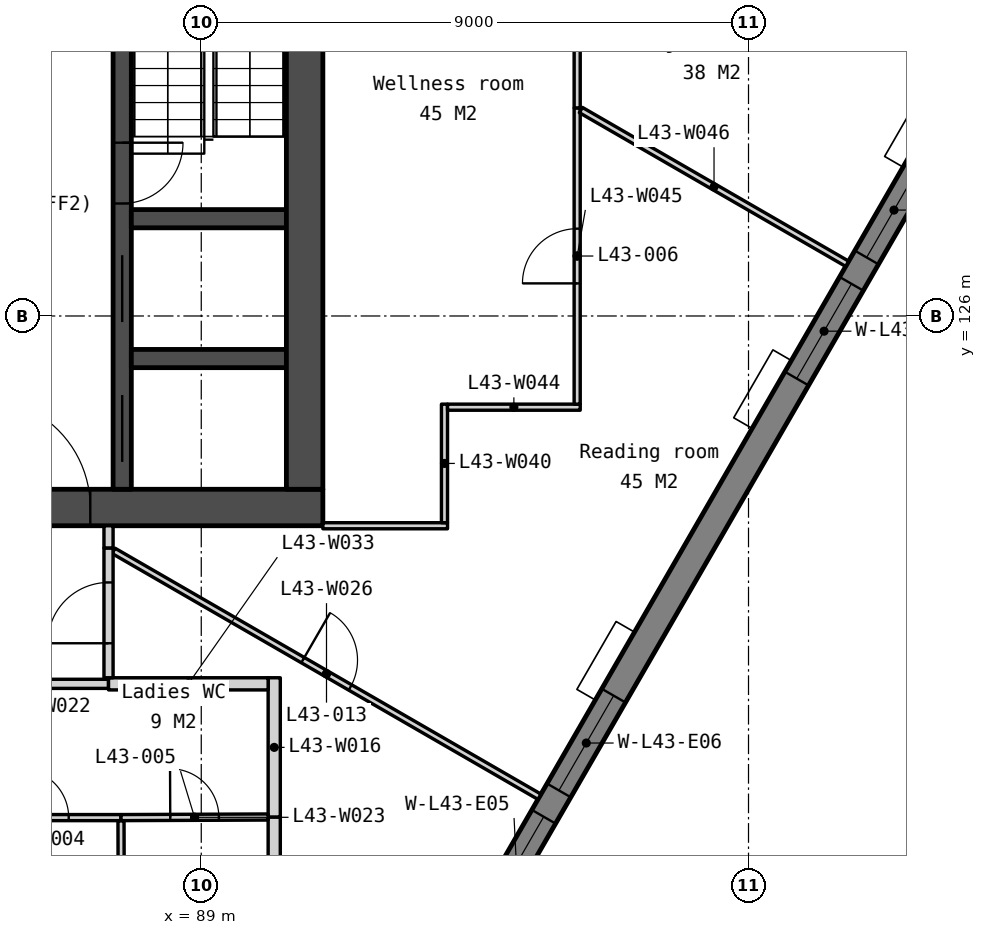
"""IFC4 building model, lengths in metres.
Left out: names, types, materials, properties, quantities, classifications, styles, units other than length and angle.
Written with IfcOpenShell. Run it as: python <this file> out.ifc"""

import sys

from ifc_helpers import new_model, si_unit, direction, frame, frame_2d, origin, place, context, subcontext, project, spatial, polyline, rectangle, outline, extrude, element, fill, save


model = new_model("IFC4")
c1 = context("Model", 3, precision=1e-05, world=origin(), true_north=direction((0.0, 1.0)))
c2 = subcontext(c1, "Body", "Model", "MODEL_VIEW")
j1 = project(units=[si_unit("LENGTHUNIT", "METRE"), si_unit("PLANEANGLEUNIT", "RADIAN")], contexts=[c1])
p1 = place(None, origin())
s1 = spatial("IfcSite", under=j1, at=p1, CompositionType="ELEMENT")
p2 = place(p1, origin())
s2 = spatial("IfcBuilding", under=s1, at=p2, CompositionType="ELEMENT")
p3 = place(p2, frame((0.0, 0.0, 171.5)))
s3 = spatial("IfcBuildingStorey", under=s2, at=p3, CompositionType="ELEMENT", Elevation=171.5)
p4 = place(p3, frame((69.0, 122.85, 0.0), z_axis=(0.0, 0.0, 1.0), x_axis=(1.0, 0.0, 0.0)))
e1 = element("IfcWall", 1, at=p4, inside=s3, PredefinedType="SOLIDWALL", context=c2, shape_type="SweptSolid", body=[
    extrude(rectangle(XDim=22.0, YDim=0.6, at=frame_2d((11.0, 0.0))), origin(), (0.0, 0.0, 1.0), 3.65),
])
p5 = place(p4, frame((16.375, 0.0, 0.0)))
e2 = element("IfcOpeningElement", 2, at=p5, cuts=e1, PredefinedType="OPENING", context=c2, shape_type="SweptSolid", body=[
    extrude(rectangle(XDim=1.8, YDim=2.1, at=frame_2d((0.9, 1.05))), frame((0.0, 0.31, 0.0), z_axis=(0.0, -1.0, 0.0), x_axis=(1.0, 0.0, 0.0)), (0.0, 0.0, 1.0), 0.62),
])
p6 = place(p4, frame((3.825, 0.0, 0.0)))
e3 = element("IfcOpeningElement", 3, at=p6, cuts=e1, PredefinedType="OPENING", context=c2, shape_type="SweptSolid", body=[
    extrude(rectangle(XDim=1.8, YDim=2.1, at=frame_2d((0.9, 1.05))), frame((0.0, 0.31, 0.0), z_axis=(0.0, -1.0, 0.0), x_axis=(1.0, 0.0, 0.0)), (0.0, 0.0, 1.0), 0.62),
])
p7 = place(p4, frame((12.85, 0.0, 0.0)))
e4 = element("IfcOpeningElement", 4, at=p7, cuts=e1, PredefinedType="OPENING", context=c2, shape_type="SweptSolid", body=[
    extrude(rectangle(XDim=1.5, YDim=2.1, at=frame_2d((0.75, 1.05))), frame((0.0, 0.31, 0.0), z_axis=(0.0, -1.0, 0.0), x_axis=(1.0, 0.0, 0.0)), (0.0, 0.0, 1.0), 0.62),
])
p8 = place(p3, frame((87.7, 133.95, 0.0), z_axis=(0.0, 0.0, 1.0), x_axis=(0.0, -1.0, 0.0)))
e5 = element("IfcWall", 5, at=p8, inside=s3, PredefinedType="SOLIDWALL", context=c2, shape_type="SweptSolid", body=[
    extrude(rectangle(XDim=10.8, YDim=0.3, at=frame_2d((5.4, 0.0))), origin(), (0.0, 0.0, 1.0), 3.65),
])
p9 = place(p8, frame((6.95, 0.0, 0.0)))
e6 = element("IfcOpeningElement", 6, at=p9, cuts=e5, PredefinedType="OPENING", context=c2, shape_type="SweptSolid", body=[
    extrude(rectangle(XDim=1.1, YDim=2.1, at=frame_2d((0.55, 1.05))), frame((0.0, 0.16, 0.0), z_axis=(0.0, -1.0, 0.0), x_axis=(1.0, 0.0, 0.0)), (0.0, 0.0, 1.0), 0.32),
])
p10 = place(p8, frame((5.1, 0.0, 0.0)))
e7 = element("IfcOpeningElement", 7, at=p10, cuts=e5, PredefinedType="OPENING", context=c2, shape_type="SweptSolid", body=[
    extrude(rectangle(XDim=1.0, YDim=2.1, at=frame_2d((0.5, 1.05))), frame((0.0, 0.16, 0.0), z_axis=(0.0, -1.0, 0.0), x_axis=(1.0, 0.0, 0.0)), (0.0, 0.0, 1.0), 0.32),
])
p11 = place(p8, frame((9.25, 0.0, 0.0)))
e8 = element("IfcOpeningElement", 8, at=p11, cuts=e5, PredefinedType="OPENING", context=c2, shape_type="SweptSolid", body=[
    extrude(rectangle(XDim=1.1, YDim=2.1, at=frame_2d((0.55, 1.05))), frame((0.0, 0.16, 0.0), z_axis=(0.0, -1.0, 0.0), x_axis=(1.0, 0.0, 0.0)), (0.0, 0.0, 1.0), 0.32),
])
for number, where, z_axis, x_axis in (
    (9, (87.85, 127.6, 0.0), (0.0, 0.0, 1.0), (1.0, 0.0, 0.0)),
    (10, (87.85, 125.3, 0.0), (0.0, 0.0, 1.0), (1.0, 0.0, 0.0)),
):
    element("IfcWall", number, at=place(p3, frame(where, z_axis=z_axis, x_axis=x_axis)), inside=s3, PredefinedType="SOLIDWALL", context=c2, shape_type="SweptSolid", body=[
        extrude(rectangle(XDim=2.55, YDim=0.3, at=frame_2d((1.275, 0.0))), origin(), (0.0, 0.0, 1.0), 3.65),
    ])
p12 = place(p3, frame((90.7, 133.95, 0.0), z_axis=(0.0, 0.0, 1.0), x_axis=(0.0, -1.0, 0.0)))
e11 = element("IfcWall", 11, at=p12, inside=s3, PredefinedType="SOLIDWALL", context=c2, shape_type="SweptSolid", body=[
    extrude(rectangle(XDim=10.8, YDim=0.6, at=frame_2d((5.4, 0.0))), origin(), (0.0, 0.0, 1.0), 3.65),
])
p13 = place(p3, frame((82.105, 96.067, -0.15), z_axis=(0.0, 0.0, 1.0), x_axis=(0.499997369791, 0.866026922331, 0.0)))
e12 = element("IfcWall", 12, at=p13, inside=s3, PredefinedType="SOLIDWALL", context=c2, shape_type="SweptSolid", body=[
    extrude(outline(polyline([(40.486, 0.0), (40.486, 3.8), (0.0, 3.8), (0.0, 0.0), (40.486, 0.0)])), frame((0.0, 0.225, 0.0), z_axis=(0.0, -1.0, 0.0), x_axis=(1.0, 0.0, 0.0)), (0.0, 0.0, 1.0), 0.45),
])
p14 = place(p13, frame((3.011, 0.0, 0.95)))
e13 = element("IfcOpeningElement", 13, at=p14, cuts=e12, PredefinedType="OPENING", context=c2, shape_type="SweptSolid", body=[
    extrude(rectangle(XDim=1.8, YDim=2.2, at=frame_2d((0.9, 1.1))), frame((0.0, 0.235, 0.0), z_axis=(0.0, -1.0, 0.0), x_axis=(1.0, 0.0, 0.0)), (0.0, 0.0, 1.0), 0.47),
])
p15 = place(p13, frame((5.311, 0.0, 0.95)))
e14 = element("IfcOpeningElement", 14, at=p15, cuts=e12, PredefinedType="OPENING", context=c2, shape_type="SweptSolid", body=[
    extrude(rectangle(XDim=1.8, YDim=2.2, at=frame_2d((0.9, 1.1))), frame((0.0, 0.235, 0.0), z_axis=(0.0, -1.0, 0.0), x_axis=(1.0, 0.0, 0.0)), (0.0, 0.0, 1.0), 0.47),
])
p16 = place(p13, frame((13.132, 0.0, 0.95)))
e15 = element("IfcOpeningElement", 15, at=p16, cuts=e12, PredefinedType="OPENING", context=c2, shape_type="SweptSolid", body=[
    extrude(rectangle(XDim=1.8, YDim=2.2, at=frame_2d((0.9, 1.1))), frame((0.0, 0.235, 0.0), z_axis=(0.0, -1.0, 0.0), x_axis=(1.0, 0.0, 0.0)), (0.0, 0.0, 1.0), 0.47),
])
p17 = place(p13, frame((15.432, 0.0, 0.95)))
e16 = element("IfcOpeningElement", 16, at=p17, cuts=e12, PredefinedType="OPENING", context=c2, shape_type="SweptSolid", body=[
    extrude(rectangle(XDim=1.8, YDim=2.2, at=frame_2d((0.9, 1.1))), frame((0.0, 0.235, 0.0), z_axis=(0.0, -1.0, 0.0), x_axis=(1.0, 0.0, 0.0)), (0.0, 0.0, 1.0), 0.47),
])
p18 = place(p13, frame((23.254, 0.0, 0.95)))
e17 = element("IfcOpeningElement", 17, at=p18, cuts=e12, PredefinedType="OPENING", context=c2, shape_type="SweptSolid", body=[
    extrude(rectangle(XDim=1.8, YDim=2.2, at=frame_2d((0.9, 1.1))), frame((0.0, 0.235, 0.0), z_axis=(0.0, -1.0, 0.0), x_axis=(1.0, 0.0, 0.0)), (0.0, 0.0, 1.0), 0.47),
])
p19 = place(p13, frame((25.554, 0.0, 0.95)))
e18 = element("IfcOpeningElement", 18, at=p19, cuts=e12, PredefinedType="OPENING", context=c2, shape_type="SweptSolid", body=[
    extrude(rectangle(XDim=1.8, YDim=2.2, at=frame_2d((0.9, 1.1))), frame((0.0, 0.235, 0.0), z_axis=(0.0, -1.0, 0.0), x_axis=(1.0, 0.0, 0.0)), (0.0, 0.0, 1.0), 0.47),
])
p20 = place(p13, frame((33.375, 0.0, 0.95)))
e19 = element("IfcOpeningElement", 19, at=p20, cuts=e12, PredefinedType="OPENING", context=c2, shape_type="SweptSolid", body=[
    extrude(rectangle(XDim=1.8, YDim=2.2, at=frame_2d((0.9, 1.1))), frame((0.0, 0.235, 0.0), z_axis=(0.0, -1.0, 0.0), x_axis=(1.0, 0.0, 0.0)), (0.0, 0.0, 1.0), 0.47),
])
p21 = place(p13, frame((35.675, 0.0, 0.95)))
e20 = element("IfcOpeningElement", 20, at=p21, cuts=e12, PredefinedType="OPENING", context=c2, shape_type="SweptSolid", body=[
    extrude(rectangle(XDim=1.8, YDim=2.2, at=frame_2d((0.9, 1.1))), frame((0.0, 0.235, 0.0), z_axis=(0.0, -1.0, 0.0), x_axis=(1.0, 0.0, 0.0)), (0.0, 0.0, 1.0), 0.47),
])
p22 = place(p3, frame((90.2, 114.05, 0.0), z_axis=(0.0, 0.0, 1.0), x_axis=(0.0, 1.0, 0.0)))
e21 = element("IfcWall", 21, at=p22, inside=s3, PredefinedType="PARTITIONING", context=c2, shape_type="SweptSolid", body=[
    extrude(rectangle(XDim=3.71, YDim=0.2, at=frame_2d((1.855, 0.0))), origin(), (0.0, 0.0, 1.0), 3.65),
])
p23 = place(p3, frame((90.2, 117.76, 0.0), z_axis=(0.0, 0.0, 1.0), x_axis=(0.0, 1.0, 0.0)))
e22 = element("IfcWall", 22, at=p23, inside=s3, PredefinedType="PARTITIONING", context=c2, shape_type="SweptSolid", body=[
    extrude(rectangle(XDim=2.29, YDim=0.2, at=frame_2d((1.145, 0.0))), origin(), (0.0, 0.0, 1.0), 3.65),
])
p24 = place(p3, frame((87.69, 114.05, 0.0), z_axis=(0.0, 0.0, 1.0), x_axis=(-0.002608686776, 0.999996597371, 0.0)))
e23 = element("IfcWall", 23, at=p24, inside=s3, PredefinedType="PARTITIONING", context=c2, shape_type="SweptSolid", body=[
    extrude(rectangle(XDim=3.65, YDim=0.1, at=frame_2d((1.825, 0.0))), origin(), (0.0, 0.0, 1.0), 3.65),
])
p25 = place(p3, frame((85.16, 117.75, 0.0), z_axis=(0.0, 0.0, 1.0), x_axis=(1.0, 0.0, 0.0)))
e24 = element("IfcWall", 24, at=p25, inside=s3, PredefinedType="PARTITIONING", context=c2, shape_type="SweptSolid", body=[
    extrude(rectangle(XDim=2.52, YDim=0.1, at=frame_2d((1.26, 0.0))), origin(), (0.0, 0.0, 1.0), 3.65),
])
p26 = place(p25, frame((0.86, 0.0, 0.0)))
e25 = element("IfcOpeningElement", 25, at=p26, cuts=e24, PredefinedType="OPENING", context=c2, shape_type="SweptSolid", body=[
    extrude(rectangle(XDim=0.8, YDim=2.1, at=frame_2d((0.4, 1.05))), frame((0.0, 0.06, 0.0), z_axis=(0.0, -1.0, 0.0), x_axis=(1.0, 0.0, 0.0)), (0.0, 0.0, 1.0), 0.12),
])
p27 = place(p3, frame((87.68, 117.75, 0.0), z_axis=(0.0, 0.0, 1.0), x_axis=(0.999992261016, 0.003934197335, 0.0)))
e26 = element("IfcWall", 26, at=p27, inside=s3, PredefinedType="PARTITIONING", context=c2, shape_type="SweptSolid", body=[
    extrude(rectangle(XDim=2.42, YDim=0.1, at=frame_2d((1.21, 0.0))), origin(), (0.0, 0.0, 1.0), 3.65),
])
p28 = place(p27, frame((0.81, 0.0, 0.0)))
e27 = element("IfcOpeningElement", 27, at=p28, cuts=e26, PredefinedType="OPENING", context=c2, shape_type="SweptSolid", body=[
    extrude(rectangle(XDim=0.8, YDim=2.1, at=frame_2d((0.4, 1.05))), frame((0.0, 0.06, 0.0), z_axis=(0.0, -1.0, 0.0), x_axis=(1.0, 0.0, 0.0)), (0.0, 0.0, 1.0), 0.12),
])
p29 = place(p3, frame((87.557, 122.137, 0.0), z_axis=(0.0, 0.0, 1.0), x_axis=(0.866029768103, -0.499992440702, 0.0)))
e28 = element("IfcWall", 28, at=p29, inside=s3, PredefinedType="PARTITIONING", context=c2, shape_type="SweptSolid", body=[
    extrude(rectangle(XDim=8.089, YDim=0.1, at=frame_2d((4.044, 0.0))), origin(), (0.0, 0.0, 1.0), 3.65),
])
p30 = place(p29, frame((3.594, 0.0, 0.0)))
e29 = element("IfcOpeningElement", 29, at=p30, cuts=e28, PredefinedType="OPENING", context=c2, shape_type="SweptSolid", body=[
    extrude(rectangle(XDim=0.9, YDim=2.1, at=frame_2d((0.45, 1.05))), frame((0.0, 0.06, 0.0), z_axis=(0.0, -1.0, 0.0), x_axis=(1.0, 0.0, 0.0)), (0.0, 0.0, 1.0), 0.12),
])
p31 = place(p3, frame((81.275, 119.95, 0.0), z_axis=(0.0, 0.0, 1.0), x_axis=(1.0, 0.0, 0.0)))
e30 = element("IfcWall", 30, at=p31, inside=s3, PredefinedType="PARTITIONING", context=c2, shape_type="SweptSolid", body=[
    extrude(rectangle(XDim=6.2, YDim=0.15, at=frame_2d((3.1, 0.0))), origin(), (0.0, 0.0, 1.0), 3.65),
])
p32 = place(p31, frame((2.6, 0.0, 0.0)))
e31 = element("IfcOpeningElement", 31, at=p32, cuts=e30, PredefinedType="OPENING", context=c2, shape_type="SweptSolid", body=[
    extrude(rectangle(XDim=1.0, YDim=2.1, at=frame_2d((0.5, 1.05))), frame((0.0, 0.085, 0.0), z_axis=(0.0, -1.0, 0.0), x_axis=(1.0, 0.0, 0.0)), (0.0, 0.0, 1.0), 0.17),
])
p33 = place(p3, frame((87.475, 119.95, 0.0), z_axis=(0.0, 0.0, 1.0), x_axis=(1.0, 0.0, 0.0)))
e32 = element("IfcWall", 32, at=p33, inside=s3, PredefinedType="PARTITIONING", context=c2, shape_type="SweptSolid", body=[
    extrude(rectangle(XDim=2.625, YDim=0.2, at=frame_2d((1.312, 0.0))), origin(), (0.0, 0.0, 1.0), 3.65),
])
p34 = place(p3, frame((87.475, 120.05, 0.0), z_axis=(0.0, 0.0, 1.0), x_axis=(0.0, 1.0, 0.0)))
e33 = element("IfcWall", 33, at=p34, inside=s3, PredefinedType="PARTITIONING", context=c2, shape_type="SweptSolid", body=[
    extrude(rectangle(XDim=2.135, YDim=0.15, at=frame_2d((1.067, 0.0))), origin(), (0.0, 0.0, 1.0), 3.65),
])
p35 = place(p34, frame((0.567, 0.0, 0.0)))
e34 = element("IfcOpeningElement", 34, at=p35, cuts=e33, PredefinedType="OPENING", context=c2, shape_type="SweptSolid", body=[
    extrude(rectangle(XDim=1.0, YDim=2.1, at=frame_2d((0.5, 1.05))), frame((0.0, 0.085, 0.0), z_axis=(0.0, -1.0, 0.0), x_axis=(1.0, 0.0, 0.0)), (0.0, 0.0, 1.0), 0.17),
])
p36 = place(p3, frame((87.475, 122.185, 0.0), z_axis=(0.0, 0.0, 1.0), x_axis=(0.0, 1.0, 0.0)))
e35 = element("IfcWall", 35, at=p36, inside=s3, PredefinedType="PARTITIONING", context=c2, shape_type="SweptSolid", body=[
    extrude(rectangle(XDim=0.365, YDim=0.15, at=frame_2d((0.183, 0.0))), origin(), (0.0, 0.0, 1.0), 3.65),
])
p37 = place(p3, frame((91.0, 122.55, 0.0), z_axis=(0.0, 0.0, 1.0), x_axis=(1.0, 0.0, 0.0)))
e36 = element("IfcWall", 36, at=p37, inside=s3, PredefinedType="PARTITIONING", context=c2, shape_type="SweptSolid", body=[
    extrude(rectangle(XDim=2.05, YDim=0.1, at=frame_2d((1.025, 0.0))), origin(), (0.0, 0.0, 1.0), 3.65),
])
p38 = place(p3, frame((93.0, 122.6, 0.0), z_axis=(0.0, 0.0, 1.0), x_axis=(0.0, 1.0, 0.0)))
e37 = element("IfcWall", 37, at=p38, inside=s3, PredefinedType="PARTITIONING", context=c2, shape_type="SweptSolid", body=[
    extrude(rectangle(XDim=1.95, YDim=0.1, at=frame_2d((0.975, 0.0))), origin(), (0.0, 0.0, 1.0), 3.65),
])
p39 = place(p3, frame((93.05, 124.5, 0.0), z_axis=(0.0, 0.0, 1.0), x_axis=(1.0, 0.0, 0.0)))
e38 = element("IfcWall", 38, at=p39, inside=s3, PredefinedType="PARTITIONING", context=c2, shape_type="SweptSolid", body=[
    extrude(rectangle(XDim=2.182, YDim=0.1, at=frame_2d((1.091, 0.0))), origin(), (0.0, 0.0, 1.0), 3.65),
])
p40 = place(p3, frame((95.182, 124.55, 0.0), z_axis=(0.0, 0.0, 1.0), x_axis=(0.0, 1.0, 0.0)))
e39 = element("IfcWall", 39, at=p40, inside=s3, PredefinedType="PARTITIONING", context=c2, shape_type="SweptSolid", body=[
    extrude(rectangle(XDim=4.872, YDim=0.1, at=frame_2d((2.436, 0.0))), origin(), (0.0, 0.0, 1.0), 3.65),
])
p41 = place(p40, frame((1.986, 0.0, 0.0)))
e40 = element("IfcOpeningElement", 40, at=p41, cuts=e39, PredefinedType="OPENING", context=c2, shape_type="SweptSolid", body=[
    extrude(rectangle(XDim=0.9, YDim=2.1, at=frame_2d((0.45, 1.05))), frame((0.0, 0.06, 0.0), z_axis=(0.0, -1.0, 0.0), x_axis=(1.0, 0.0, 0.0)), (0.0, 0.0, 1.0), 0.12),
])
p42 = place(p3, frame((95.243, 129.387, 0.0), z_axis=(0.0, 0.0, 1.0), x_axis=(0.866030444867, -0.499991268487, 0.0)))
e41 = element("IfcWall", 41, at=p42, inside=s3, PredefinedType="PARTITIONING", context=c2, shape_type="SweptSolid", body=[
    extrude(rectangle(XDim=5.058, YDim=0.1, at=frame_2d((2.529, 0.0))), origin(), (0.0, 0.0, 1.0), 3.65),
])
p43 = place(p3, frame((95.182, 129.422, 0.0), z_axis=(0.0, 0.0, 1.0), x_axis=(0.0, 1.0, 0.0)))
e42 = element("IfcWall", 42, at=p43, inside=s3, PredefinedType="PARTITIONING", context=c2, shape_type="SweptSolid", body=[
    extrude(rectangle(XDim=5.128, YDim=0.1, at=frame_2d((2.564, 0.0))), origin(), (0.0, 0.0, 1.0), 3.65),
])
p44 = place(p43, frame((2.114, 0.0, 0.0)))
e43 = element("IfcOpeningElement", 43, at=p44, cuts=e42, PredefinedType="OPENING", context=c2, shape_type="SweptSolid", body=[
    extrude(rectangle(XDim=0.9, YDim=2.1, at=frame_2d((0.45, 1.05))), frame((0.0, 0.06, 0.0), z_axis=(0.0, -1.0, 0.0), x_axis=(1.0, 0.0, 0.0)), (0.0, 0.0, 1.0), 0.12),
])
p45 = place(p9, origin())
e44 = element("IfcDoor", 44, at=p45, inside=s3, OperationType="SLIDING_TO_LEFT", PredefinedType="DOOR", context=c2, shape_type="SweptSolid", body=[
    extrude(rectangle(XDim=1.1, YDim=2.1, at=frame_2d((0.55, 1.05))), frame((0.0, 0.025, 0.0), z_axis=(0.0, -1.0, 0.0), x_axis=(1.0, 0.0, 0.0)), (0.0, 0.0, 1.0), 0.05),
])
fill(e6, e44)
p46 = place(p5, origin())
e45 = element("IfcDoor", 45, at=p46, inside=s3, OperationType="DOUBLE_DOOR_DOUBLE_SWING", PredefinedType="DOOR", context=c2, shape_type="SweptSolid", body=[
    extrude(rectangle(XDim=1.8, YDim=2.1, at=frame_2d((0.9, 1.05))), frame((0.0, 0.025, 0.0), z_axis=(0.0, -1.0, 0.0), x_axis=(1.0, 0.0, 0.0)), (0.0, 0.0, 1.0), 0.05),
])
fill(e2, e45)
p47 = place(p10, origin())
e46 = element("IfcDoor", 46, at=p47, inside=s3, OperationType="SINGLE_SWING_LEFT", PredefinedType="DOOR", context=c2, shape_type="SweptSolid", body=[
    extrude(rectangle(XDim=1.0, YDim=2.1, at=frame_2d((0.5, 1.05))), frame((0.0, 0.025, 0.0), z_axis=(0.0, -1.0, 0.0), x_axis=(1.0, 0.0, 0.0)), (0.0, 0.0, 1.0), 0.05),
])
fill(e7, e46)
p48 = place(p11, origin())
e47 = element("IfcDoor", 47, at=p48, inside=s3, OperationType="SLIDING_TO_LEFT", PredefinedType="DOOR", context=c2, shape_type="SweptSolid", body=[
    extrude(rectangle(XDim=1.1, YDim=2.1, at=frame_2d((0.55, 1.05))), frame((0.0, 0.025, 0.0), z_axis=(0.0, -1.0, 0.0), x_axis=(1.0, 0.0, 0.0)), (0.0, 0.0, 1.0), 0.05),
])
fill(e8, e47)
p49 = place(p18, origin())
e48 = element("IfcWindow", 48, at=p49, inside=s3, PartitioningType="SINGLE_PANEL", PredefinedType="WINDOW", context=c2, shape_type="SweptSolid", body=[
    extrude(rectangle(XDim=1.8, YDim=2.2, at=frame_2d((0.9, 1.1))), frame((0.0, 0.03, 0.0), z_axis=(0.0, -1.0, 0.0), x_axis=(1.0, 0.0, 0.0)), (0.0, 0.0, 1.0), 0.06),
])
fill(e17, e48)
p50 = place(p19, origin())
e49 = element("IfcWindow", 49, at=p50, inside=s3, PartitioningType="SINGLE_PANEL", PredefinedType="WINDOW", context=c2, shape_type="SweptSolid", body=[
    extrude(rectangle(XDim=1.8, YDim=2.2, at=frame_2d((0.9, 1.1))), frame((0.0, 0.03, 0.0), z_axis=(0.0, -1.0, 0.0), x_axis=(1.0, 0.0, 0.0)), (0.0, 0.0, 1.0), 0.06),
])
fill(e18, e49)
p51 = place(p20, origin())
e50 = element("IfcWindow", 50, at=p51, inside=s3, PartitioningType="SINGLE_PANEL", PredefinedType="WINDOW", context=c2, shape_type="SweptSolid", body=[
    extrude(rectangle(XDim=1.8, YDim=2.2, at=frame_2d((0.9, 1.1))), frame((0.0, 0.03, 0.0), z_axis=(0.0, -1.0, 0.0), x_axis=(1.0, 0.0, 0.0)), (0.0, 0.0, 1.0), 0.06),
])
fill(e19, e50)
p52 = place(p21, origin())
e51 = element("IfcWindow", 51, at=p52, inside=s3, PartitioningType="SINGLE_PANEL", PredefinedType="WINDOW", context=c2, shape_type="SweptSolid", body=[
    extrude(rectangle(XDim=1.8, YDim=2.2, at=frame_2d((0.9, 1.1))), frame((0.0, 0.03, 0.0), z_axis=(0.0, -1.0, 0.0), x_axis=(1.0, 0.0, 0.0)), (0.0, 0.0, 1.0), 0.06),
])
fill(e20, e51)
p53 = place(p26, origin())
e52 = element("IfcDoor", 52, at=p53, inside=s3, OperationType="SINGLE_SWING_LEFT", PredefinedType="DOOR", context=c2, shape_type="SweptSolid", body=[
    extrude(rectangle(XDim=0.8, YDim=2.1, at=frame_2d((0.4, 1.05))), frame((0.0, 0.025, 0.0), z_axis=(0.0, -1.0, 0.0), x_axis=(1.0, 0.0, 0.0)), (0.0, 0.0, 1.0), 0.05),
])
fill(e25, e52)
p54 = place(p28, origin())
e53 = element("IfcDoor", 53, at=p54, inside=s3, OperationType="SINGLE_SWING_LEFT", PredefinedType="DOOR", context=c2, shape_type="SweptSolid", body=[
    extrude(rectangle(XDim=0.8, YDim=2.1, at=frame_2d((0.4, 1.05))), frame((0.0, 0.025, 0.0), z_axis=(0.0, -1.0, 0.0), x_axis=(1.0, 0.0, 0.0)), (0.0, 0.0, 1.0), 0.05),
])
fill(e27, e53)
p55 = place(p41, origin())
e54 = element("IfcDoor", 54, at=p55, inside=s3, OperationType="SINGLE_SWING_LEFT", PredefinedType="DOOR", context=c2, shape_type="SweptSolid", body=[
    extrude(rectangle(XDim=0.9, YDim=2.1, at=frame_2d((0.45, 1.05))), frame((0.0, 0.025, 0.0), z_axis=(0.0, -1.0, 0.0), x_axis=(1.0, 0.0, 0.0)), (0.0, 0.0, 1.0), 0.05),
])
fill(e40, e54)
p56 = place(p35, origin())
e55 = element("IfcDoor", 55, at=p56, inside=s3, OperationType="SINGLE_SWING_LEFT", PredefinedType="DOOR", context=c2, shape_type="SweptSolid", body=[
    extrude(rectangle(XDim=1.0, YDim=2.1, at=frame_2d((0.5, 1.05))), frame((0.0, 0.025, 0.0), z_axis=(0.0, -1.0, 0.0), x_axis=(1.0, 0.0, 0.0)), (0.0, 0.0, 1.0), 0.05),
])
fill(e34, e55)
p57 = place(p30, origin())
e56 = element("IfcDoor", 56, at=p57, inside=s3, OperationType="SINGLE_SWING_LEFT", PredefinedType="DOOR", context=c2, shape_type="SweptSolid", body=[
    extrude(rectangle(XDim=0.9, YDim=2.1, at=frame_2d((0.45, 1.05))), frame((0.0, 0.025, 0.0), z_axis=(0.0, -1.0, 0.0), x_axis=(1.0, 0.0, 0.0)), (0.0, 0.0, 1.0), 0.05),
])
fill(e29, e56)
save(model, sys.argv[1])
